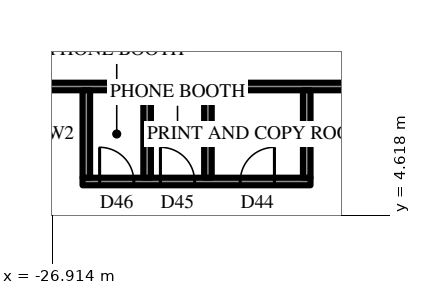
"""IFC4 building model, lengths in metres.
Left out: names, types, materials, properties, quantities, classifications, styles, units other than length and angle.
Written with IfcOpenShell. Run it as: python <this file> out.ifc"""

import sys

from ifc_helpers import new_model, si_unit, direction, frame, frame_2d, origin, place, context, subcontext, project, spatial, rectangle, extrude, element, fill, save


model = new_model("IFC4")
c1 = context("Model", 3, precision=1e-05, world=origin(), true_north=direction((0.0, 1.0)))
c2 = subcontext(c1, "Body", "Model", "MODEL_VIEW")
j1 = project(units=[si_unit("LENGTHUNIT", "METRE"), si_unit("PLANEANGLEUNIT", "RADIAN")], contexts=[c1])
p1 = place(None, origin())
s1 = spatial("IfcSite", under=j1, at=p1, CompositionType="ELEMENT")
p2 = place(p1, origin())
s2 = spatial("IfcBuilding", under=s1, at=p2, CompositionType="ELEMENT")
p3 = place(p2, frame((0.0, 0.0, 132.1)))
s3 = spatial("IfcBuildingStorey", under=s2, at=p3, CompositionType="ELEMENT", Elevation=132.1)
p4 = place(p3, frame((-18.6, 8.0, 0.0), z_axis=(0.0, 0.0, 1.0), x_axis=(-1.0, 0.0, 0.0)))
e1 = element("IfcWall", 1, at=p4, inside=s3, PredefinedType="PARTITIONING", context=c2, shape_type="SweptSolid", body=[
    extrude(rectangle(XDim=12.9, YDim=0.2, at=frame_2d((6.45, 0.0))), origin(), (0.0, 0.0, 1.0), 4.0),
])
p5 = place(p3, frame((-20.115, 5.5, 0.0), z_axis=(0.0, 0.0, 1.0), x_axis=(-1.0, 0.0, 0.0)))
e2 = element("IfcWall", 2, at=p5, inside=s3, PredefinedType="PARTITIONING", context=c2, shape_type="SweptSolid", body=[
    extrude(rectangle(XDim=6.0, YDim=0.2, at=frame_2d((3.0, 0.0))), origin(), (0.0, 0.0, 1.0), 4.0),
])
p6 = place(p5, frame((0.95, 0.0, 0.0)))
e3 = element("IfcOpeningElement", 3, at=p6, cuts=e2, PredefinedType="OPENING", context=c2, shape_type="SweptSolid", body=[
    extrude(rectangle(XDim=0.9, YDim=2.2, at=frame_2d((0.45, 1.1))), frame((0.0, 0.11, 0.0), z_axis=(0.0, -1.0, 0.0), x_axis=(1.0, 0.0, 0.0)), (0.0, 0.0, 1.0), 0.22),
])
p7 = place(p5, frame((3.05, 0.0, 0.0)))
e4 = element("IfcOpeningElement", 4, at=p7, cuts=e2, PredefinedType="OPENING", context=c2, shape_type="SweptSolid", body=[
    extrude(rectangle(XDim=0.9, YDim=2.2, at=frame_2d((0.45, 1.1))), frame((0.0, 0.11, 0.0), z_axis=(0.0, -1.0, 0.0), x_axis=(1.0, 0.0, 0.0)), (0.0, 0.0, 1.0), 0.22),
])
p8 = place(p5, frame((4.65, 0.0, 0.0)))
e5 = element("IfcOpeningElement", 5, at=p8, cuts=e2, PredefinedType="OPENING", context=c2, shape_type="SweptSolid", body=[
    extrude(rectangle(XDim=0.9, YDim=2.2, at=frame_2d((0.45, 1.1))), frame((0.0, 0.11, 0.0), z_axis=(0.0, -1.0, 0.0), x_axis=(1.0, 0.0, 0.0)), (0.0, 0.0, 1.0), 0.22),
])
for number, where, z_axis, x_axis in (
    (6, (-20.215, 7.9, 0.0), (0.0, 0.0, 1.0), (0.0, -1.0, 0.0)),
    (7, (-22.815, 7.9, 0.0), (0.0, 0.0, 1.0), (0.0, -1.0, 0.0)),
    (8, (-24.415, 7.9, 0.0), (0.0, 0.0, 1.0), (0.0, -1.0, 0.0)),
    (9, (-26.015, 7.9, 0.0), (0.0, 0.0, 1.0), (0.0, -1.0, 0.0)),
):
    element("IfcWall", number, at=place(p3, frame(where, z_axis=z_axis, x_axis=x_axis)), inside=s3, PredefinedType="PARTITIONING", context=c2, shape_type="SweptSolid", body=[
        extrude(rectangle(XDim=2.3, YDim=0.2, at=frame_2d((1.15, 0.0))), origin(), (0.0, 0.0, 1.0), 4.0),
    ])
p9 = place(p6, frame((0.9, 0.0, 0.0), z_axis=(0.0, 0.0, 1.0), x_axis=(-1.0, 0.0, 0.0)))
e10 = element("IfcDoor", 10, at=p9, inside=s3, OperationType="SINGLE_SWING_LEFT", PredefinedType="DOOR", context=c2, shape_type="SweptSolid", body=[
    extrude(rectangle(XDim=0.9, YDim=2.2, at=frame_2d((0.45, 1.1))), frame((0.0, 0.025, 0.0), z_axis=(0.0, -1.0, 0.0), x_axis=(1.0, 0.0, 0.0)), (0.0, 0.0, 1.0), 0.05),
])
fill(e3, e10)
p10 = place(p7, frame((0.9, 0.0, 0.0), z_axis=(0.0, 0.0, 1.0), x_axis=(-1.0, 0.0, 0.0)))
e11 = element("IfcDoor", 11, at=p10, inside=s3, OperationType="SINGLE_SWING_RIGHT", PredefinedType="DOOR", context=c2, shape_type="SweptSolid", body=[
    extrude(rectangle(XDim=0.9, YDim=2.2, at=frame_2d((0.45, 1.1))), frame((0.0, 0.025, 0.0), z_axis=(0.0, -1.0, 0.0), x_axis=(1.0, 0.0, 0.0)), (0.0, 0.0, 1.0), 0.05),
])
fill(e4, e11)
p11 = place(p8, frame((0.9, 0.0, 0.0), z_axis=(0.0, 0.0, 1.0), x_axis=(-1.0, 0.0, 0.0)))
e12 = element("IfcDoor", 12, at=p11, inside=s3, OperationType="SINGLE_SWING_RIGHT", PredefinedType="DOOR", context=c2, shape_type="SweptSolid", body=[
    extrude(rectangle(XDim=0.9, YDim=2.2, at=frame_2d((0.45, 1.1))), frame((0.0, 0.025, 0.0), z_axis=(0.0, -1.0, 0.0), x_axis=(1.0, 0.0, 0.0)), (0.0, 0.0, 1.0), 0.05),
])
fill(e5, e12)
save(model, sys.argv[1])
